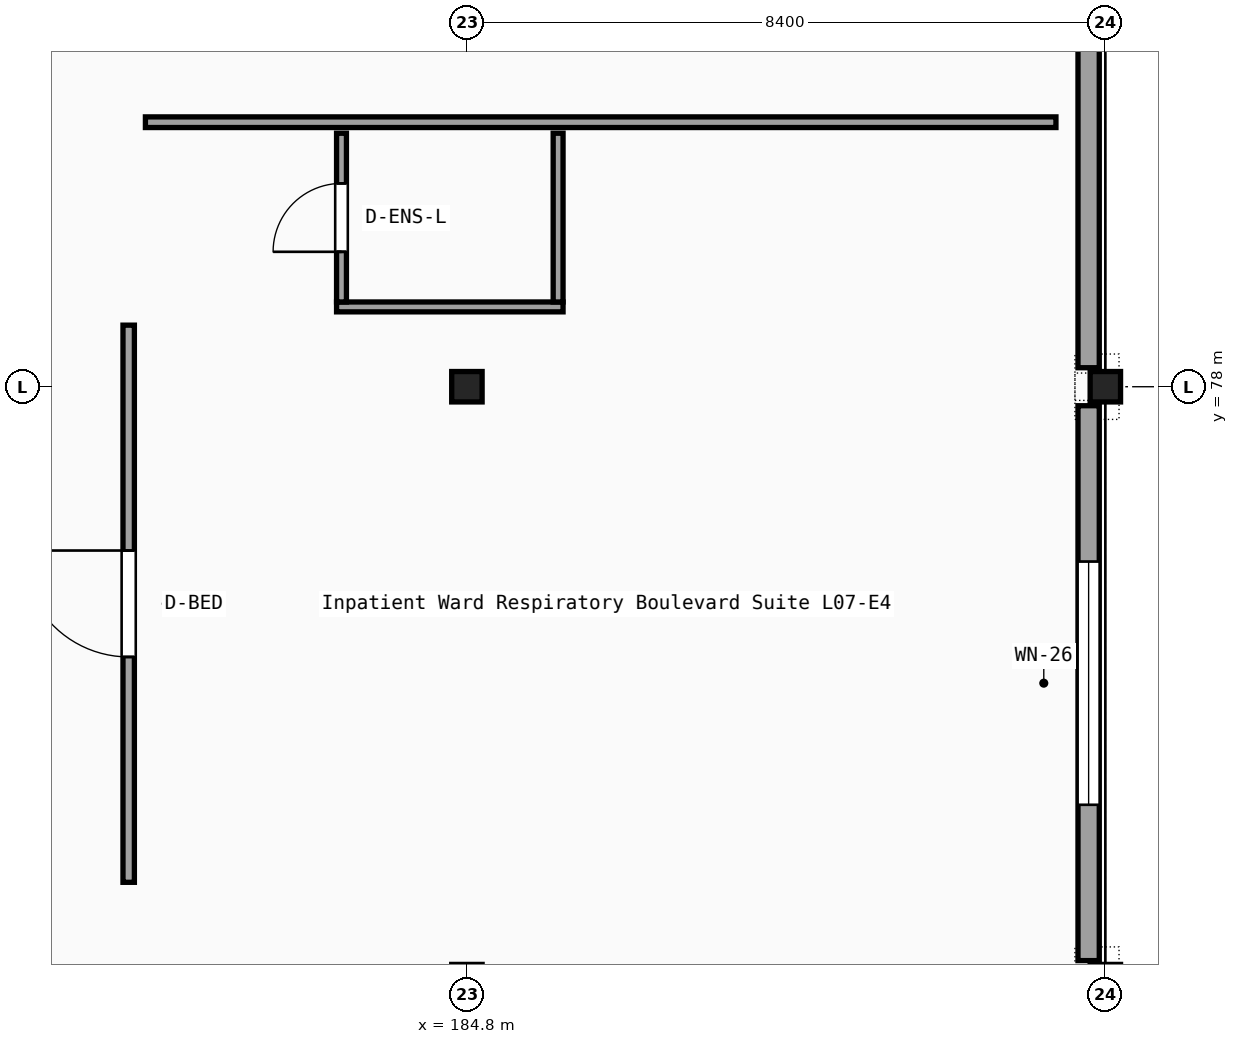
"""IFC4 building model, lengths in metres.
Left out: names, types, materials, properties, quantities, classifications, styles, units other than length and angle.
Written with IfcOpenShell. Run it as: python <this file> out.ifc"""

import sys

from ifc_helpers import new_model, si_unit, direction, frame, frame_2d, origin, origin_2d, place, context, subcontext, project, spatial, rectangle, i_section, extrude, element, fill, save


model = new_model("IFC4")
c1 = context("Model", 3, precision=1e-05, world=origin(), true_north=direction((0.0, 1.0)))
c2 = subcontext(c1, "Body", "Model", "MODEL_VIEW")
j1 = project(units=[si_unit("LENGTHUNIT", "METRE"), si_unit("PLANEANGLEUNIT", "RADIAN")], contexts=[c1])
p1 = place(None, origin())
s1 = spatial("IfcSite", under=j1, at=p1, CompositionType="ELEMENT")
p2 = place(p1, origin())
s2 = spatial("IfcBuilding", under=s1, at=p2, CompositionType="ELEMENT")
p3 = place(p2, frame((0.0, 0.0, 31.05)))
s3 = spatial("IfcBuildingStorey", under=s2, at=p3, CompositionType="ELEMENT", Elevation=31.05)
for number, where, z_axis, x_axis in (
    (1, (184.8, 78.0, 0.0), (0.0, 0.0, 1.0), (1.0, 0.0, 0.0)),
    (2, (193.2, 78.0, 0.0), (0.0, 0.0, 1.0), (1.0, 0.0, 0.0)),
):
    element("IfcColumn", number, at=place(p3, frame(where, z_axis=z_axis, x_axis=x_axis)), inside=s3, PredefinedType="COLUMN", context=c2, shape_type="SweptSolid", body=[
        extrude(i_section(OverallWidth=0.3, OverallDepth=0.4, WebThickness=0.013, FlangeThickness=0.024, FilletRadius=0.027, at=origin_2d()), origin(), (0.0, 0.0, 1.0), 4.05),
    ])
p4 = place(p3, frame((192.98, 70.45, 0.0), z_axis=(0.0, 0.0, 1.0), x_axis=(0.0, 1.0, 0.0)))
e3 = element("IfcWall", 3, at=p4, inside=s3, PredefinedType="SOLIDWALL", context=c2, shape_type="SweptSolid", body=[
    extrude(rectangle(XDim=7.3, YDim=0.28, at=frame_2d((3.65, 0.0))), origin(), (0.0, 0.0, 1.0), 3.44),
])
p5 = place(p4, frame((2.05, 0.0, 0.75)))
e4 = element("IfcOpeningElement", 4, at=p5, cuts=e3, PredefinedType="OPENING", context=c2, shape_type="SweptSolid", body=[
    extrude(rectangle(XDim=3.2, YDim=1.8, at=frame_2d((1.6, 0.9))), frame((0.0, 0.15, 0.0), z_axis=(0.0, -1.0, 0.0), x_axis=(1.0, 0.0, 0.0)), (0.0, 0.0, 1.0), 0.3),
])
p6 = place(p3, frame((192.98, 78.25, 0.0), z_axis=(0.0, 0.0, 1.0), x_axis=(0.0, 1.0, 0.0)))
e5 = element("IfcWall", 5, at=p6, inside=s3, PredefinedType="SOLIDWALL", context=c2, shape_type="SweptSolid", body=[
    extrude(rectangle(XDim=7.3, YDim=0.28, at=frame_2d((3.65, 0.0))), origin(), (0.0, 0.0, 1.0), 3.44),
])
p7 = place(p3, frame((180.35, 71.48, 0.0), z_axis=(0.0, 0.0, 1.0), x_axis=(0.0, 1.0, 0.0)))
e6 = element("IfcWall", 6, at=p7, inside=s3, PredefinedType="PARTITIONING", context=c2, shape_type="SweptSolid", body=[
    extrude(rectangle(XDim=7.33, YDim=0.15, at=frame_2d((3.665, 0.0))), origin(), (0.0, 0.0, 1.0), 3.34),
])
p8 = place(p7, frame((2.965, 0.0, 0.0)))
e7 = element("IfcOpeningElement", 7, at=p8, cuts=e6, PredefinedType="OPENING", context=c2, shape_type="SweptSolid", body=[
    extrude(rectangle(XDim=1.4, YDim=2.2, at=frame_2d((0.7, 1.1))), frame((0.0, 0.085, 0.0), z_axis=(0.0, -1.0, 0.0), x_axis=(1.0, 0.0, 0.0)), (0.0, 0.0, 1.0), 0.17),
])
p9 = place(p3, frame((180.57, 81.48, 0.0), z_axis=(0.0, 0.0, 1.0), x_axis=(1.0, 0.0, 0.0)))
e8 = element("IfcWall", 8, at=p9, inside=s3, PredefinedType="PARTITIONING", context=c2, shape_type="SweptSolid", body=[
    extrude(rectangle(XDim=11.98, YDim=0.14, at=frame_2d((5.99, 0.0))), origin(), (0.0, 0.0, 1.0), 3.55),
])
p10 = place(p3, frame((183.085, 79.05, 0.0), z_axis=(0.0, 0.0, 1.0), x_axis=(1.0, 0.0, 0.0)))
e9 = element("IfcWall", 9, at=p10, inside=s3, PredefinedType="PARTITIONING", context=c2, shape_type="SweptSolid", body=[
    extrude(rectangle(XDim=2.98, YDim=0.13, at=frame_2d((1.49, 0.0))), origin(), (0.0, 0.0, 1.0), 3.55),
])
p11 = place(p3, frame((183.15, 79.115, 0.0), z_axis=(0.0, 0.0, 1.0), x_axis=(0.0, 1.0, 0.0)))
e10 = element("IfcWall", 10, at=p11, inside=s3, PredefinedType="PARTITIONING", context=c2, shape_type="SweptSolid", body=[
    extrude(rectangle(XDim=2.22, YDim=0.13, at=frame_2d((1.11, 0.0))), origin(), (0.0, 0.0, 1.0), 3.77),
])
p12 = place(p11, frame((0.66, 0.0, 0.0)))
e11 = element("IfcOpeningElement", 11, at=p12, cuts=e10, PredefinedType="OPENING", context=c2, shape_type="SweptSolid", body=[
    extrude(rectangle(XDim=0.9, YDim=2.1, at=frame_2d((0.45, 1.05))), frame((0.0, 0.075, 0.0), z_axis=(0.0, -1.0, 0.0), x_axis=(1.0, 0.0, 0.0)), (0.0, 0.0, 1.0), 0.15),
])
p13 = place(p3, frame((186.0, 79.115, 0.0), z_axis=(0.0, 0.0, 1.0), x_axis=(0.0, 1.0, 0.0)))
e12 = element("IfcWall", 12, at=p13, inside=s3, PredefinedType="PARTITIONING", context=c2, shape_type="SweptSolid", body=[
    extrude(rectangle(XDim=2.22, YDim=0.13, at=frame_2d((1.11, 0.0))), origin(), (0.0, 0.0, 1.0), 3.77),
])
p14 = place(p5, origin())
e13 = element("IfcWindow", 13, at=p14, inside=s3, PartitioningType="SINGLE_PANEL", PredefinedType="WINDOW", context=c2, shape_type="SweptSolid", body=[
    extrude(rectangle(XDim=3.2, YDim=1.8, at=frame_2d((1.6, 0.9))), frame((0.0, 0.03, 0.0), z_axis=(0.0, -1.0, 0.0), x_axis=(1.0, 0.0, 0.0)), (0.0, 0.0, 1.0), 0.06),
])
fill(e4, e13)
p15 = place(p8, origin())
e14 = element("IfcDoor", 14, at=p15, inside=s3, OperationType="SINGLE_SWING_RIGHT", PredefinedType="DOOR", context=c2, shape_type="SweptSolid", body=[
    extrude(rectangle(XDim=1.4, YDim=2.2, at=frame_2d((0.7, 1.1))), frame((0.0, 0.025, 0.0), z_axis=(0.0, -1.0, 0.0), x_axis=(1.0, 0.0, 0.0)), (0.0, 0.0, 1.0), 0.05),
])
fill(e7, e14)
p16 = place(p12, origin())
e15 = element("IfcDoor", 15, at=p16, inside=s3, OperationType="SINGLE_SWING_LEFT", PredefinedType="DOOR", context=c2, shape_type="SweptSolid", body=[
    extrude(rectangle(XDim=0.9, YDim=2.1, at=frame_2d((0.45, 1.05))), frame((0.0, 0.025, 0.0), z_axis=(0.0, -1.0, 0.0), x_axis=(1.0, 0.0, 0.0)), (0.0, 0.0, 1.0), 0.05),
])
fill(e11, e15)
save(model, sys.argv[1])
